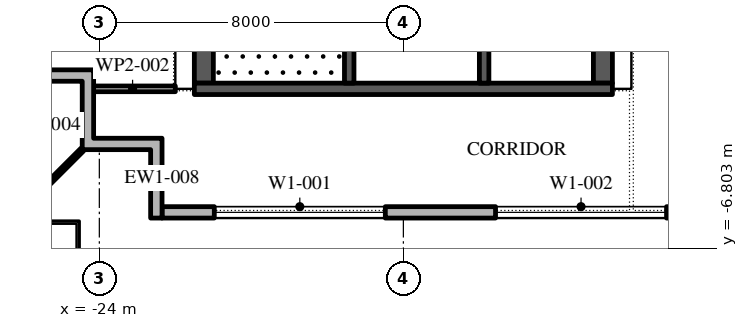
"""IFC4 building model, lengths in metres.
Left out: names, types, materials, properties, quantities, classifications, styles, units other than length and angle.
Written with IfcOpenShell. Run it as: python <this file> out.ifc"""

import sys

from ifc_helpers import new_model, si_unit, direction, frame, frame_2d, origin, place, context, subcontext, project, spatial, polyline, rectangle, outline, extrude, element, fill, save


model = new_model("IFC4")
c1 = context("Model", 3, precision=1e-05, world=origin(), true_north=direction((0.0, 1.0)))
c2 = subcontext(c1, "Body", "Model", "MODEL_VIEW")
j1 = project(units=[si_unit("LENGTHUNIT", "METRE"), si_unit("PLANEANGLEUNIT", "RADIAN")], contexts=[c1])
p1 = place(None, origin())
s1 = spatial("IfcSite", under=j1, at=p1, CompositionType="ELEMENT")
p2 = place(p1, origin())
s2 = spatial("IfcBuilding", under=s1, at=p2, CompositionType="ELEMENT")
p3 = place(p2, frame((0.0, 0.0, 330.0)))
s3 = spatial("IfcBuildingStorey", under=s2, at=p3, CompositionType="ELEMENT", Elevation=330.0)
p4 = place(p3, frame((-22.35, -5.85, 0.0), z_axis=(0.0, 0.0, 1.0), x_axis=(1.0, 0.0, 0.0)))
e1 = element("IfcWall", 1, at=p4, inside=s3, PredefinedType="STANDARD", context=c2, shape_type="SweptSolid", body=[
    extrude(rectangle(XDim=45.0, YDim=0.3, at=frame_2d((22.5, 0.0))), origin(), (0.0, 0.0, 1.0), 4.0),
])
p5 = place(p4, frame((1.375, 0.0, 0.45)))
e2 = element("IfcOpeningElement", 2, at=p5, cuts=e1, PredefinedType="OPENING", context=c2, shape_type="SweptSolid", body=[
    extrude(rectangle(XDim=4.5, YDim=3.05, at=frame_2d((2.25, 1.525))), frame((0.0, 0.16, 0.0), z_axis=(0.0, -1.0, 0.0), x_axis=(1.0, 0.0, 0.0)), (0.0, 0.0, 1.0), 0.32),
])
p6 = place(p4, frame((8.775, 0.0, 0.45)))
e3 = element("IfcOpeningElement", 3, at=p6, cuts=e1, PredefinedType="OPENING", context=c2, shape_type="SweptSolid", body=[
    extrude(rectangle(XDim=4.5, YDim=3.05, at=frame_2d((2.25, 1.525))), frame((0.0, 0.16, 0.0), z_axis=(0.0, -1.0, 0.0), x_axis=(1.0, 0.0, 0.0)), (0.0, 0.0, 1.0), 0.32),
])
p7 = place(p4, frame((17.375, 0.0, 0.0)))
e4 = element("IfcOpeningElement", 4, at=p7, cuts=e1, PredefinedType="OPENING", context=c2, shape_type="SweptSolid", body=[
    extrude(rectangle(XDim=2.4, YDim=3.5, at=frame_2d((1.2, 1.75))), frame((0.0, 0.16, 0.0), z_axis=(0.0, -1.0, 0.0), x_axis=(1.0, 0.0, 0.0)), (0.0, 0.0, 1.0), 0.32),
])
p8 = place(p4, frame((23.875, 0.0, 0.45)))
e5 = element("IfcOpeningElement", 5, at=p8, cuts=e1, PredefinedType="OPENING", context=c2, shape_type="SweptSolid", body=[
    extrude(rectangle(XDim=4.5, YDim=3.05, at=frame_2d((2.25, 1.525))), frame((0.0, 0.16, 0.0), z_axis=(0.0, -1.0, 0.0), x_axis=(1.0, 0.0, 0.0)), (0.0, 0.0, 1.0), 0.32),
])
p9 = place(p4, frame((31.425, 0.0, 0.45)))
e6 = element("IfcOpeningElement", 6, at=p9, cuts=e1, PredefinedType="OPENING", context=c2, shape_type="SweptSolid", body=[
    extrude(rectangle(XDim=4.5, YDim=3.05, at=frame_2d((2.25, 1.525))), frame((0.0, 0.16, 0.0), z_axis=(0.0, -1.0, 0.0), x_axis=(1.0, 0.0, 0.0)), (0.0, 0.0, 1.0), 0.32),
])
p10 = place(p4, frame((38.975, 0.0, 0.45)))
e7 = element("IfcOpeningElement", 7, at=p10, cuts=e1, PredefinedType="OPENING", context=c2, shape_type="SweptSolid", body=[
    extrude(rectangle(XDim=4.5, YDim=3.05, at=frame_2d((2.25, 1.525))), frame((0.0, 0.16, 0.0), z_axis=(0.0, -1.0, 0.0), x_axis=(1.0, 0.0, 0.0)), (0.0, 0.0, 1.0), 0.32),
])
p11 = place(p3, origin())
e8 = element("IfcWall", 8, at=p11, inside=s3, PredefinedType="STANDARD", context=c2, shape_type="SweptSolid", body=[
    extrude(outline(polyline([(-22.65, -4.2), (-24.45, -4.2), (-24.45, -2.4), (-25.95, -2.4), (-25.95, -2.1), (-24.15, -2.1), (-24.15, -3.9), (-22.35, -3.9), (-22.35, -6.0), (-22.65, -6.0), (-22.65, -4.2)])), origin(), (0.0, 0.0, 1.0), 4.0),
])
p12 = place(p3, frame((-24.45, -4.2, -0.05), z_axis=(0.0, 0.0, 1.0), x_axis=(-0.707106781187, -0.707106781187, 0.0)))
e9 = element("IfcWall", 9, at=p12, inside=s3, PredefinedType="STANDARD", context=c2, shape_type="SweptSolid", body=[
    extrude(rectangle(XDim=2.667, YDim=0.1, at=frame_2d((1.333, 0.0))), origin(), (0.0, 0.0, 1.0), 4.05),
])
p13 = place(p3, frame((-21.25, -2.45, 0.0), z_axis=(0.0, 0.0, 1.0), x_axis=(0.0, 1.0, 0.0)))
e10 = element("IfcWall", 10, at=p13, inside=s3, PredefinedType="SHEAR", context=c2, shape_type="SweptSolid", body=[
    extrude(rectangle(XDim=27.9, YDim=0.5, at=frame_2d((13.95, 0.0))), origin(), (0.0, 0.0, 1.0), 4.0),
])
p14 = place(p13, frame((5.05, 0.0, 0.0)))
e11 = element("IfcOpeningElement", 11, at=p14, cuts=e10, PredefinedType="OPENING", context=c2, shape_type="SweptSolid", body=[
    extrude(rectangle(XDim=1.2, YDim=2.1, at=frame_2d((0.6, 1.05))), frame((0.0, 0.26, 0.0), z_axis=(0.0, -1.0, 0.0), x_axis=(1.0, 0.0, 0.0)), (0.0, 0.0, 1.0), 0.52),
])
p15 = place(p13, frame((21.65, 0.0, 0.0)))
e12 = element("IfcOpeningElement", 12, at=p15, cuts=e10, PredefinedType="OPENING", context=c2, shape_type="SweptSolid", body=[
    extrude(rectangle(XDim=1.2, YDim=2.1, at=frame_2d((0.6, 1.05))), frame((0.0, 0.26, 0.0), z_axis=(0.0, -1.0, 0.0), x_axis=(1.0, 0.0, 0.0)), (0.0, 0.0, 1.0), 0.52),
])
p16 = place(p3, frame((-10.75, -2.45, 0.0), z_axis=(0.0, 0.0, 1.0), x_axis=(0.0, 1.0, 0.0)))
e13 = element("IfcWall", 13, at=p16, inside=s3, PredefinedType="SHEAR", context=c2, shape_type="SweptSolid", body=[
    extrude(rectangle(XDim=27.9, YDim=0.5, at=frame_2d((13.95, 0.0))), origin(), (0.0, 0.0, 1.0), 4.0),
])
p17 = place(p16, frame((23.65, 0.0, 0.0)))
e14 = element("IfcOpeningElement", 14, at=p17, cuts=e13, PredefinedType="OPENING", context=c2, shape_type="SweptSolid", body=[
    extrude(rectangle(XDim=2.4, YDim=2.1, at=frame_2d((1.2, 1.05))), frame((0.0, 0.26, 0.0), z_axis=(0.0, -1.0, 0.0), x_axis=(1.0, 0.0, 0.0)), (0.0, 0.0, 1.0), 0.52),
])
p18 = place(p16, frame((1.087, 0.0, 0.0)))
e15 = element("IfcOpeningElement", 15, at=p18, cuts=e13, PredefinedType="OPENING", context=c2, shape_type="SweptSolid", body=[
    extrude(rectangle(XDim=0.9, YDim=2.1, at=frame_2d((0.45, 1.05))), frame((0.0, 0.26, 0.0), z_axis=(0.0, -1.0, 0.0), x_axis=(1.0, 0.0, 0.0)), (0.0, 0.0, 1.0), 0.52),
])
p19 = place(p16, frame((4.262, 0.0, 0.0)))
e16 = element("IfcOpeningElement", 16, at=p19, cuts=e13, PredefinedType="OPENING", context=c2, shape_type="SweptSolid", body=[
    extrude(rectangle(XDim=1.0, YDim=2.1, at=frame_2d((0.5, 1.05))), frame((0.0, 0.26, 0.0), z_axis=(0.0, -1.0, 0.0), x_axis=(1.0, 0.0, 0.0)), (0.0, 0.0, 1.0), 0.52),
])
p20 = place(p3, frame((-21.5, -2.6, 0.0), z_axis=(0.0, 0.0, 1.0), x_axis=(1.0, 0.0, 0.0)))
e17 = element("IfcWall", 17, at=p20, inside=s3, PredefinedType="SHEAR", context=c2, shape_type="SweptSolid", body=[
    extrude(rectangle(XDim=11.0, YDim=0.3, at=frame_2d((5.5, 0.0))), origin(), (0.0, 0.0, 1.0), 4.0),
])
p21 = place(p3, frame((-17.425, -2.45, 0.0), z_axis=(0.0, 0.0, 1.0), x_axis=(0.0, 1.0, 0.0)))
e18 = element("IfcWall", 18, at=p21, inside=s3, PredefinedType="SHEAR", context=c2, shape_type="SweptSolid", body=[
    extrude(rectangle(XDim=6.3, YDim=0.25, at=frame_2d((3.15, 0.0))), origin(), (0.0, 0.0, 1.0), 4.0),
])
p22 = place(p21, frame((5.05, 0.0, 0.0)))
e19 = element("IfcOpeningElement", 19, at=p22, cuts=e18, PredefinedType="OPENING", context=c2, shape_type="SweptSolid", body=[
    extrude(rectangle(XDim=1.2, YDim=2.1, at=frame_2d((0.6, 1.05))), frame((0.0, 0.135, 0.0), z_axis=(0.0, -1.0, 0.0), x_axis=(1.0, 0.0, 0.0)), (0.0, 0.0, 1.0), 0.27),
])
p23 = place(p3, frame((-13.875, -2.45, 0.0), z_axis=(0.0, 0.0, 1.0), x_axis=(0.0, 1.0, 0.0)))
e20 = element("IfcWall", 20, at=p23, inside=s3, PredefinedType="SHEAR", context=c2, shape_type="SweptSolid", body=[
    extrude(rectangle(XDim=21.3, YDim=0.25, at=frame_2d((10.65, 0.0))), origin(), (0.0, 0.0, 1.0), 4.0),
])
p24 = place(p23, frame((11.357, 0.0, 0.0)))
e21 = element("IfcOpeningElement", 21, at=p24, cuts=e20, PredefinedType="OPENING", context=c2, shape_type="SweptSolid", body=[
    extrude(rectangle(XDim=0.9, YDim=2.1, at=frame_2d((0.45, 1.05))), frame((0.0, 0.135, 0.0), z_axis=(0.0, -1.0, 0.0), x_axis=(1.0, 0.0, 0.0)), (0.0, 0.0, 1.0), 0.27),
])
p25 = place(p23, frame((6.971, 0.0, 0.0)))
e22 = element("IfcOpeningElement", 22, at=p25, cuts=e20, PredefinedType="OPENING", context=c2, shape_type="SweptSolid", body=[
    extrude(rectangle(XDim=1.1, YDim=2.1, at=frame_2d((0.55, 1.05))), frame((0.0, 0.135, 0.0), z_axis=(0.0, -1.0, 0.0), x_axis=(1.0, 0.0, 0.0)), (0.0, 0.0, 1.0), 0.27),
])
p26 = place(p23, frame((15.543, 0.0, 0.0)))
e23 = element("IfcOpeningElement", 23, at=p26, cuts=e20, PredefinedType="OPENING", context=c2, shape_type="SweptSolid", body=[
    extrude(rectangle(XDim=1.1, YDim=2.1, at=frame_2d((0.55, 1.05))), frame((0.0, 0.135, 0.0), z_axis=(0.0, -1.0, 0.0), x_axis=(1.0, 0.0, 0.0)), (0.0, 0.0, 1.0), 0.27),
])
p27 = place(p23, frame((17.686, 0.0, 0.0)))
e24 = element("IfcOpeningElement", 24, at=p27, cuts=e20, PredefinedType="OPENING", context=c2, shape_type="SweptSolid", body=[
    extrude(rectangle(XDim=1.1, YDim=2.1, at=frame_2d((0.55, 1.05))), frame((0.0, 0.135, 0.0), z_axis=(0.0, -1.0, 0.0), x_axis=(1.0, 0.0, 0.0)), (0.0, 0.0, 1.0), 0.27),
])
p28 = place(p23, frame((19.829, 0.0, 0.0)))
e25 = element("IfcOpeningElement", 25, at=p28, cuts=e20, PredefinedType="OPENING", context=c2, shape_type="SweptSolid", body=[
    extrude(rectangle(XDim=1.1, YDim=2.1, at=frame_2d((0.55, 1.05))), frame((0.0, 0.135, 0.0), z_axis=(0.0, -1.0, 0.0), x_axis=(1.0, 0.0, 0.0)), (0.0, 0.0, 1.0), 0.27),
])
p29 = place(p3, frame((-24.25, -2.6, 0.0), z_axis=(0.0, 0.0, 1.0), x_axis=(1.0, 0.0, 0.0)))
e26 = element("IfcWall", 26, at=p29, inside=s3, PredefinedType="PARTITIONING", context=c2, shape_type="SweptSolid", body=[
    extrude(rectangle(XDim=2.25, YDim=0.15, at=frame_2d((1.125, 0.0))), origin(), (0.0, 0.0, 1.0), 4.0),
])
p30 = place(p5, origin())
e27 = element("IfcWindow", 27, at=p30, inside=s3, PartitioningType="DOUBLE_PANEL_VERTICAL", PredefinedType="WINDOW", context=c2, shape_type="SweptSolid", body=[
    extrude(rectangle(XDim=4.5, YDim=3.05, at=frame_2d((2.25, 1.525))), frame((0.0, 0.03, 0.0), z_axis=(0.0, -1.0, 0.0), x_axis=(1.0, 0.0, 0.0)), (0.0, 0.0, 1.0), 0.06),
])
fill(e2, e27)
p31 = place(p6, origin())
e28 = element("IfcWindow", 28, at=p31, inside=s3, PartitioningType="DOUBLE_PANEL_VERTICAL", PredefinedType="WINDOW", context=c2, shape_type="SweptSolid", body=[
    extrude(rectangle(XDim=4.5, YDim=3.05, at=frame_2d((2.25, 1.525))), frame((0.0, 0.03, 0.0), z_axis=(0.0, -1.0, 0.0), x_axis=(1.0, 0.0, 0.0)), (0.0, 0.0, 1.0), 0.06),
])
fill(e3, e28)
save(model, sys.argv[1])
